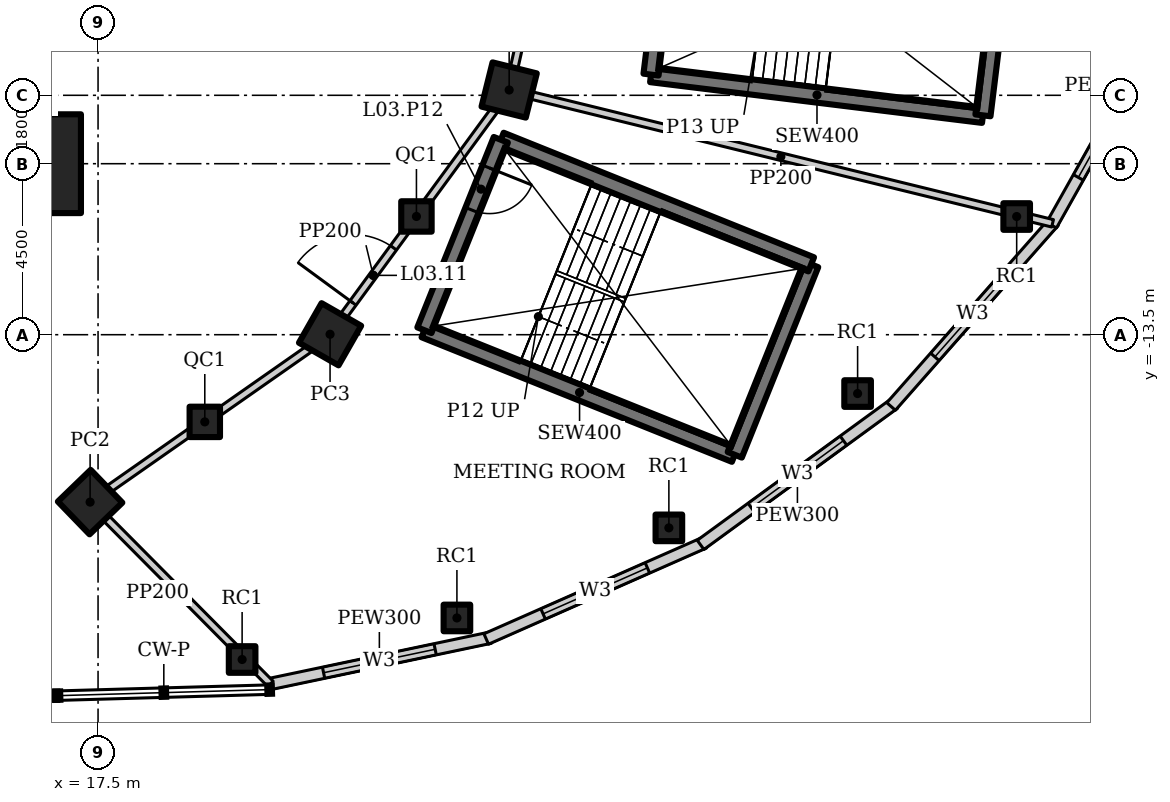
"""IFC4 building model, lengths in metres.
Left out: names, types, materials, properties, quantities, classifications, styles, units other than length and angle.
Written with IfcOpenShell. Run it as: python <this file> out.ifc"""

import sys

from ifc_helpers import new_model, si_unit, direction, frame, frame_2d, origin, origin_2d, place, context, subcontext, project, spatial, rectangle, hollow_rectangle, extrude, element, fill, save


model = new_model("IFC4")
c1 = context("Model", 3, precision=1e-05, world=origin(), true_north=direction((0.0, 1.0)))
c2 = subcontext(c1, "Body", "Model", "MODEL_VIEW")
j1 = project(units=[si_unit("LENGTHUNIT", "METRE"), si_unit("PLANEANGLEUNIT", "RADIAN")], contexts=[c1])
p1 = place(None, origin())
s1 = spatial("IfcSite", under=j1, at=p1, CompositionType="ELEMENT")
p2 = place(p1, origin())
s2 = spatial("IfcBuilding", under=s1, at=p2, CompositionType="ELEMENT")
p3 = place(p2, frame((0.0, 0.0, 22.0)))
s3 = spatial("IfcBuildingStorey", under=s2, at=p3, CompositionType="ELEMENT", Elevation=22.0)
p4 = place(p3, frame((15.75, -9.0, 0.0), z_axis=(0.0, 0.0, 1.0), x_axis=(1.0, 0.0, 0.0)))
e1 = element("IfcColumn", 1, at=p4, inside=s3, PredefinedType="COLUMN", context=c2, shape_type="SweptSolid", body=[
    extrude(hollow_rectangle(XDim=2.6, YDim=2.6, WallThickness=0.13, at=origin_2d()), origin(), (0.0, 0.0, 1.0), 5.0),
])
p5 = place(p3, frame((17.291, -17.905, 0.0), z_axis=(0.0, 0.0, 1.0), x_axis=(0.719339800339, 0.694658370459, 0.0)))
e2 = element("IfcColumn", 2, at=p5, inside=s3, PredefinedType="COLUMN", context=c2, shape_type="SweptSolid", body=[
    extrude(hollow_rectangle(XDim=1.2, YDim=1.2, WallThickness=0.1, at=origin_2d()), origin(), (0.0, 0.0, 1.0), 5.0),
])
p6 = place(p3, frame((23.605, -13.489, 0.0), z_axis=(0.0, 0.0, 1.0), x_axis=(0.496139221777, 0.86824298017, 0.0)))
e3 = element("IfcColumn", 3, at=p6, inside=s3, PredefinedType="COLUMN", context=c2, shape_type="SweptSolid", body=[
    extrude(hollow_rectangle(XDim=1.2, YDim=1.2, WallThickness=0.12, at=origin_2d()), origin(), (0.0, 0.0, 1.0), 5.0),
])
p7 = place(p3, frame((28.318, -7.06, 0.0), z_axis=(0.0, 0.0, 1.0), x_axis=(0.2419218956, 0.970295726276, 0.0)))
e4 = element("IfcColumn", 4, at=p7, inside=s3, PredefinedType="COLUMN", context=c2, shape_type="SweptSolid", body=[
    extrude(hollow_rectangle(XDim=1.2, YDim=1.2, WallThickness=0.1, at=origin_2d()), origin(), (0.0, 0.0, 1.0), 5.0),
])
for number, where, z_axis, x_axis in (
    (5, (20.309, -15.794, 0.0), (0.0, 0.0, 1.0), (1.0, 0.0, 0.0)),
    (6, (25.878, -10.388, 0.0), (0.0, 0.0, 1.0), (1.0, 0.0, 0.0)),
):
    element("IfcColumn", number, at=place(p3, frame(where, z_axis=z_axis, x_axis=x_axis)), inside=s3, PredefinedType="COLUMN", context=c2, shape_type="SweptSolid", body=[
        extrude(hollow_rectangle(XDim=0.8, YDim=0.8, WallThickness=0.05, at=origin_2d()), origin(), (0.0, 0.0, 1.0), 5.0),
    ])
for number, where, z_axis, x_axis in (
    (7, (26.943, -20.954, 0.0), (0.0, 0.0, 1.0), (1.0, 0.0, 0.0)),
    (8, (37.487, -15.049, 0.0), (0.0, 0.0, 1.0), (1.0, 0.0, 0.0)),
    (9, (21.291, -22.047, 0.0), (0.0, 0.0, 1.0), (1.0, 0.0, 0.0)),
    (10, (32.521, -18.583, 0.0), (0.0, 0.0, 1.0), (1.0, 0.0, 0.0)),
    (11, (41.672, -10.39, 0.0), (0.0, 0.0, 1.0), (1.0, 0.0, 0.0)),
):
    element("IfcColumn", number, at=place(p3, frame(where, z_axis=z_axis, x_axis=x_axis)), inside=s3, PredefinedType="COLUMN", context=c2, shape_type="SweptSolid", body=[
        extrude(hollow_rectangle(XDim=0.7, YDim=0.7, WallThickness=0.04, at=origin_2d()), origin(), (0.0, 0.0, 1.0), 5.0),
    ])
p8 = place(p3, frame((21.985, -22.7, 0.0), z_axis=(0.0, 0.0, 1.0), x_axis=(0.978625319268, 0.205651366364, 0.0)))
e12 = element("IfcWall", 12, at=p8, inside=s3, PredefinedType="SOLIDWALL", context=c2, shape_type="SweptSolid", body=[
    extrude(rectangle(XDim=5.962, YDim=0.3, at=frame_2d((2.981, 0.0))), origin(), (0.0, 0.0, 1.0), 4.8),
])
p9 = place(p8, frame((1.481, 0.0, 0.9)))
e13 = element("IfcOpeningElement", 13, at=p9, cuts=e12, PredefinedType="OPENING", context=c2, shape_type="SweptSolid", body=[
    extrude(rectangle(XDim=3.0, YDim=2.0, at=frame_2d((1.5, 1.0))), frame((0.0, 0.16, 0.0), z_axis=(0.0, -1.0, 0.0), x_axis=(1.0, 0.0, 0.0)), (0.0, 0.0, 1.0), 0.32),
])
p10 = place(p3, frame((27.714, -21.508, 0.0), z_axis=(0.0, 0.0, 1.0), x_axis=(0.914855209389, 0.403782052416, 0.0)))
e14 = element("IfcWall", 14, at=p10, inside=s3, PredefinedType="SOLIDWALL", context=c2, shape_type="SweptSolid", body=[
    extrude(rectangle(XDim=6.271, YDim=0.3, at=frame_2d((3.136, 0.0))), origin(), (0.0, 0.0, 1.0), 4.8),
])
p11 = place(p10, frame((1.636, 0.0, 0.9)))
e15 = element("IfcOpeningElement", 15, at=p11, cuts=e14, PredefinedType="OPENING", context=c2, shape_type="SweptSolid", body=[
    extrude(rectangle(XDim=3.0, YDim=2.0, at=frame_2d((1.5, 1.0))), frame((0.0, 0.16, 0.0), z_axis=(0.0, -1.0, 0.0), x_axis=(1.0, 0.0, 0.0)), (0.0, 0.0, 1.0), 0.32),
])
p12 = place(p3, frame((33.355, -19.031, 0.0), z_axis=(0.0, 0.0, 1.0), x_axis=(0.807898511933, 0.589321639189, 0.0)))
e16 = element("IfcWall", 16, at=p12, inside=s3, PredefinedType="SOLIDWALL", context=c2, shape_type="SweptSolid", body=[
    extrude(rectangle(XDim=6.309, YDim=0.3, at=frame_2d((3.154, 0.0))), origin(), (0.0, 0.0, 1.0), 4.8),
])
p13 = place(p12, frame((1.654, 0.0, 0.9)))
e17 = element("IfcOpeningElement", 17, at=p13, cuts=e16, PredefinedType="OPENING", context=c2, shape_type="SweptSolid", body=[
    extrude(rectangle(XDim=3.0, YDim=2.0, at=frame_2d((1.5, 1.0))), frame((0.0, 0.16, 0.0), z_axis=(0.0, -1.0, 0.0), x_axis=(1.0, 0.0, 0.0)), (0.0, 0.0, 1.0), 0.32),
])
p14 = place(p3, frame((38.368, -15.389, 0.0), z_axis=(0.0, 0.0, 1.0), x_axis=(0.661196672464, 0.75021261008, 0.0)))
e18 = element("IfcWall", 18, at=p14, inside=s3, PredefinedType="SOLIDWALL", context=c2, shape_type="SweptSolid", body=[
    extrude(rectangle(XDim=6.481, YDim=0.3, at=frame_2d((3.24, 0.0))), origin(), (0.0, 0.0, 1.0), 4.8),
])
p15 = place(p14, frame((1.74, 0.0, 0.9)))
e19 = element("IfcOpeningElement", 19, at=p15, cuts=e18, PredefinedType="OPENING", context=c2, shape_type="SweptSolid", body=[
    extrude(rectangle(XDim=3.0, YDim=2.0, at=frame_2d((1.5, 1.0))), frame((0.0, 0.16, 0.0), z_axis=(0.0, -1.0, 0.0), x_axis=(1.0, 0.0, 0.0)), (0.0, 0.0, 1.0), 0.32),
])
p16 = place(p3, frame((42.589, -10.618, 0.0), z_axis=(0.0, 0.0, 1.0), x_axis=(0.489563544979, 0.871967622924, 0.0)))
e20 = element("IfcWall", 20, at=p16, inside=s3, PredefinedType="SOLIDWALL", context=c2, shape_type="SweptSolid", body=[
    extrude(rectangle(XDim=5.883, YDim=0.3, at=frame_2d((2.941, 0.0))), origin(), (0.0, 0.0, 1.0), 4.8),
])
p17 = place(p16, frame((1.441, 0.0, 0.9)))
e21 = element("IfcOpeningElement", 21, at=p17, cuts=e20, PredefinedType="OPENING", context=c2, shape_type="SweptSolid", body=[
    extrude(rectangle(XDim=3.0, YDim=2.0, at=frame_2d((1.5, 1.0))), frame((0.0, 0.16, 0.0), z_axis=(0.0, -1.0, 0.0), x_axis=(1.0, 0.0, 0.0)), (0.0, 0.0, 1.0), 0.32),
])
p18 = place(p3, frame((17.291, -17.905, 0.0), z_axis=(0.0, 0.0, 1.0), x_axis=(0.819431174801, 0.573177590075, 0.0)))
e22 = element("IfcWall", 22, at=p18, inside=s3, PredefinedType="SOLIDWALL", context=c2, shape_type="SweptSolid", body=[
    extrude(rectangle(XDim=3.683, YDim=0.2, at=frame_2d((1.842, 0.0))), origin(), (0.0, 0.0, 1.0), 4.396),
])
p19 = place(p3, frame((20.309, -15.794, 0.0), z_axis=(0.0, 0.0, 1.0), x_axis=(0.81942291701, 0.57318939547, 0.0)))
e23 = element("IfcWall", 23, at=p19, inside=s3, PredefinedType="SOLIDWALL", context=c2, shape_type="SweptSolid", body=[
    extrude(rectangle(XDim=4.022, YDim=0.2, at=frame_2d((2.011, 0.0))), origin(), (0.0, 0.0, 1.0), 3.3),
])
p20 = place(p3, frame((23.605, -13.489, 0.0), z_axis=(0.0, 0.0, 1.0), x_axis=(0.591286566758, 0.806461527893, 0.0)))
e24 = element("IfcWall", 24, at=p20, inside=s3, PredefinedType="SOLIDWALL", context=c2, shape_type="SweptSolid", body=[
    extrude(rectangle(XDim=3.844, YDim=0.2, at=frame_2d((1.922, 0.0))), origin(), (0.0, 0.0, 1.0), 4.396),
])
p21 = place(p20, frame((1.022, 0.0, 0.0)))
e25 = element("IfcOpeningElement", 25, at=p21, cuts=e24, PredefinedType="OPENING", context=c2, shape_type="SweptSolid", body=[
    extrude(rectangle(XDim=1.8, YDim=2.4, at=frame_2d((0.9, 1.2))), frame((0.0, 0.11, 0.0), z_axis=(0.0, -1.0, 0.0), x_axis=(1.0, 0.0, 0.0)), (0.0, 0.0, 1.0), 0.22),
])
p22 = place(p3, frame((25.878, -10.388, 0.0), z_axis=(0.0, 0.0, 1.0), x_axis=(0.591255937291, 0.806483984105, 0.0)))
e26 = element("IfcWall", 26, at=p22, inside=s3, PredefinedType="SOLIDWALL", context=c2, shape_type="SweptSolid", body=[
    extrude(rectangle(XDim=4.127, YDim=0.2, at=frame_2d((2.063, 0.0))), origin(), (0.0, 0.0, 1.0), 3.3),
])
p23 = place(p3, frame((28.318, -7.06, 0.0), z_axis=(0.0, 0.0, 1.0), x_axis=(0.218673326171, 0.97579812278, 0.0)))
e27 = element("IfcWall", 27, at=p23, inside=s3, PredefinedType="SOLIDWALL", context=c2, shape_type="SweptSolid", body=[
    extrude(rectangle(XDim=3.574, YDim=0.2, at=frame_2d((1.787, 0.0))), origin(), (0.0, 0.0, 1.0), 4.396),
])
p24 = place(p3, frame((17.291, -17.905, 0.0), z_axis=(0.0, 0.0, 1.0), x_axis=(0.704348079756, -0.709854761585, 0.0)))
e28 = element("IfcWall", 28, at=p24, inside=s3, PredefinedType="SOLIDWALL", context=c2, shape_type="SweptSolid", body=[
    extrude(rectangle(XDim=6.739, YDim=0.2, at=frame_2d((3.37, 0.0))), origin(), (0.0, 0.0, 1.0), 4.198),
])
p25 = place(p3, frame((28.318, -7.06, 0.0), z_axis=(0.0, 0.0, 1.0), x_axis=(0.971190644534, -0.238303864783, 0.0)))
e29 = element("IfcWall", 29, at=p25, inside=s3, PredefinedType="SOLIDWALL", context=c2, shape_type="SweptSolid", body=[
    extrude(rectangle(XDim=14.723, YDim=0.2, at=frame_2d((7.361, 0.0))), origin(), (0.0, 0.0, 1.0), 3.3),
])
p26 = place(p3, frame((26.087, -13.382, 0.0), z_axis=(0.0, 0.0, 1.0), x_axis=(0.92801678004, -0.372538395288, 0.0)))
e30 = element("IfcWall", 30, at=p26, inside=s3, PredefinedType="SHEAR", context=c2, shape_type="SweptSolid", body=[
    extrude(rectangle(XDim=8.8, YDim=0.4, at=frame_2d((4.4, 0.0))), origin(), (0.0, 0.0, 1.0), 5.0),
])
p27 = place(p3, frame((34.253, -16.66, 0.0), z_axis=(0.0, 0.0, 1.0), x_axis=(0.372544066459, 0.928014503414, 0.0)))
e31 = element("IfcWall", 31, at=p27, inside=s3, PredefinedType="SHEAR", context=c2, shape_type="SweptSolid", body=[
    extrude(rectangle(XDim=5.4, YDim=0.4, at=frame_2d((2.7, 0.0))), origin(), (0.0, 0.0, 1.0), 5.0),
])
p28 = place(p3, frame((36.265, -11.649, 0.0), z_axis=(0.0, 0.0, 1.0), x_axis=(-0.928007188331, 0.372562287955, 0.0)))
e32 = element("IfcWall", 32, at=p28, inside=s3, PredefinedType="SHEAR", context=c2, shape_type="SweptSolid", body=[
    extrude(rectangle(XDim=8.8, YDim=0.4, at=frame_2d((4.4, 0.0))), origin(), (0.0, 0.0, 1.0), 5.0),
])
p29 = place(p3, frame((28.099, -8.37, 0.0), z_axis=(0.0, 0.0, 1.0), x_axis=(-0.372528436202, -0.928020777904, 0.0)))
e33 = element("IfcWall", 33, at=p29, inside=s3, PredefinedType="SHEAR", context=c2, shape_type="SweptSolid", body=[
    extrude(rectangle(XDim=5.4, YDim=0.4, at=frame_2d((2.7, 0.0))), origin(), (0.0, 0.0, 1.0), 5.0),
])
p30 = place(p29, frame((0.8, 0.0, 0.0)))
e34 = element("IfcOpeningElement", 34, at=p30, cuts=e33, PredefinedType="OPENING", context=c2, shape_type="SweptSolid", body=[
    extrude(rectangle(XDim=1.2, YDim=2.1, at=frame_2d((0.6, 1.05))), frame((0.0, 0.21, 0.0), z_axis=(0.0, -1.0, 0.0), x_axis=(1.0, 0.0, 0.0)), (0.0, 0.0, 1.0), 0.42),
])
p31 = place(p3, frame((32.051, -6.656, 0.0), z_axis=(0.0, 0.0, 1.0), x_axis=(0.992545280606, -0.121876437212, 0.0)))
e35 = element("IfcWall", 35, at=p31, inside=s3, PredefinedType="SHEAR", context=c2, shape_type="SweptSolid", body=[
    extrude(rectangle(XDim=8.8, YDim=0.4, at=frame_2d((4.4, 0.0))), origin(), (0.0, 0.0, 1.0), 5.0),
])
p32 = place(p3, frame((40.785, -7.728, 0.0), z_axis=(0.0, 0.0, 1.0), x_axis=(0.121892082937, 0.992543359314, 0.0)))
e36 = element("IfcWall", 36, at=p32, inside=s3, PredefinedType="SHEAR", context=c2, shape_type="SweptSolid", body=[
    extrude(rectangle(XDim=5.4, YDim=0.4, at=frame_2d((2.7, 0.0))), origin(), (0.0, 0.0, 1.0), 5.0),
])
p33 = place(p3, frame((32.708, -1.296, 0.0), z_axis=(0.0, 0.0, 1.0), x_axis=(-0.12184754212, -0.99254882826, 0.0)))
e37 = element("IfcWall", 37, at=p33, inside=s3, PredefinedType="SHEAR", context=c2, shape_type="SweptSolid", body=[
    extrude(rectangle(XDim=5.4, YDim=0.4, at=frame_2d((2.7, 0.0))), origin(), (0.0, 0.0, 1.0), 5.0),
])
p34 = place(p33, frame((0.8, 0.0, 0.0)))
e38 = element("IfcOpeningElement", 38, at=p34, cuts=e37, PredefinedType="OPENING", context=c2, shape_type="SweptSolid", body=[
    extrude(rectangle(XDim=1.2, YDim=2.1, at=frame_2d((0.6, 1.05))), frame((0.0, 0.21, 0.0), z_axis=(0.0, -1.0, 0.0), x_axis=(1.0, 0.0, 0.0)), (0.0, 0.0, 1.0), 0.42),
])
p35 = place(p9, origin())
e39 = element("IfcWindow", 39, at=p35, inside=s3, PartitioningType="SINGLE_PANEL", PredefinedType="WINDOW", context=c2, shape_type="SweptSolid", body=[
    extrude(rectangle(XDim=3.0, YDim=2.0, at=frame_2d((1.5, 1.0))), frame((0.0, 0.03, 0.0), z_axis=(0.0, -1.0, 0.0), x_axis=(1.0, 0.0, 0.0)), (0.0, 0.0, 1.0), 0.06),
])
fill(e13, e39)
p36 = place(p11, origin())
e40 = element("IfcWindow", 40, at=p36, inside=s3, PartitioningType="SINGLE_PANEL", PredefinedType="WINDOW", context=c2, shape_type="SweptSolid", body=[
    extrude(rectangle(XDim=3.0, YDim=2.0, at=frame_2d((1.5, 1.0))), frame((0.0, 0.03, 0.0), z_axis=(0.0, -1.0, 0.0), x_axis=(1.0, 0.0, 0.0)), (0.0, 0.0, 1.0), 0.06),
])
fill(e15, e40)
p37 = place(p13, origin())
e41 = element("IfcWindow", 41, at=p37, inside=s3, PartitioningType="SINGLE_PANEL", PredefinedType="WINDOW", context=c2, shape_type="SweptSolid", body=[
    extrude(rectangle(XDim=3.0, YDim=2.0, at=frame_2d((1.5, 1.0))), frame((0.0, 0.03, 0.0), z_axis=(0.0, -1.0, 0.0), x_axis=(1.0, 0.0, 0.0)), (0.0, 0.0, 1.0), 0.06),
])
fill(e17, e41)
p38 = place(p15, origin())
e42 = element("IfcWindow", 42, at=p38, inside=s3, PartitioningType="SINGLE_PANEL", PredefinedType="WINDOW", context=c2, shape_type="SweptSolid", body=[
    extrude(rectangle(XDim=3.0, YDim=2.0, at=frame_2d((1.5, 1.0))), frame((0.0, 0.03, 0.0), z_axis=(0.0, -1.0, 0.0), x_axis=(1.0, 0.0, 0.0)), (0.0, 0.0, 1.0), 0.06),
])
fill(e19, e42)
p39 = place(p17, origin())
e43 = element("IfcWindow", 43, at=p39, inside=s3, PartitioningType="SINGLE_PANEL", PredefinedType="WINDOW", context=c2, shape_type="SweptSolid", body=[
    extrude(rectangle(XDim=3.0, YDim=2.0, at=frame_2d((1.5, 1.0))), frame((0.0, 0.03, 0.0), z_axis=(0.0, -1.0, 0.0), x_axis=(1.0, 0.0, 0.0)), (0.0, 0.0, 1.0), 0.06),
])
fill(e21, e43)
p40 = place(p21, origin())
e44 = element("IfcDoor", 44, at=p40, inside=s3, OperationType="DOUBLE_DOOR_DOUBLE_SWING", PredefinedType="DOOR", context=c2, shape_type="SweptSolid", body=[
    extrude(rectangle(XDim=1.8, YDim=2.4, at=frame_2d((0.9, 1.2))), frame((0.0, 0.025, 0.0), z_axis=(0.0, -1.0, 0.0), x_axis=(1.0, 0.0, 0.0)), (0.0, 0.0, 1.0), 0.05),
])
fill(e25, e44)
p41 = place(p30, origin())
e45 = element("IfcDoor", 45, at=p41, inside=s3, OperationType="SINGLE_SWING_RIGHT", PredefinedType="DOOR", context=c2, shape_type="SweptSolid", body=[
    extrude(rectangle(XDim=1.2, YDim=2.1, at=frame_2d((0.6, 1.05))), frame((0.0, 0.025, 0.0), z_axis=(0.0, -1.0, 0.0), x_axis=(1.0, 0.0, 0.0)), (0.0, 0.0, 1.0), 0.05),
])
fill(e34, e45)
save(model, sys.argv[1])
